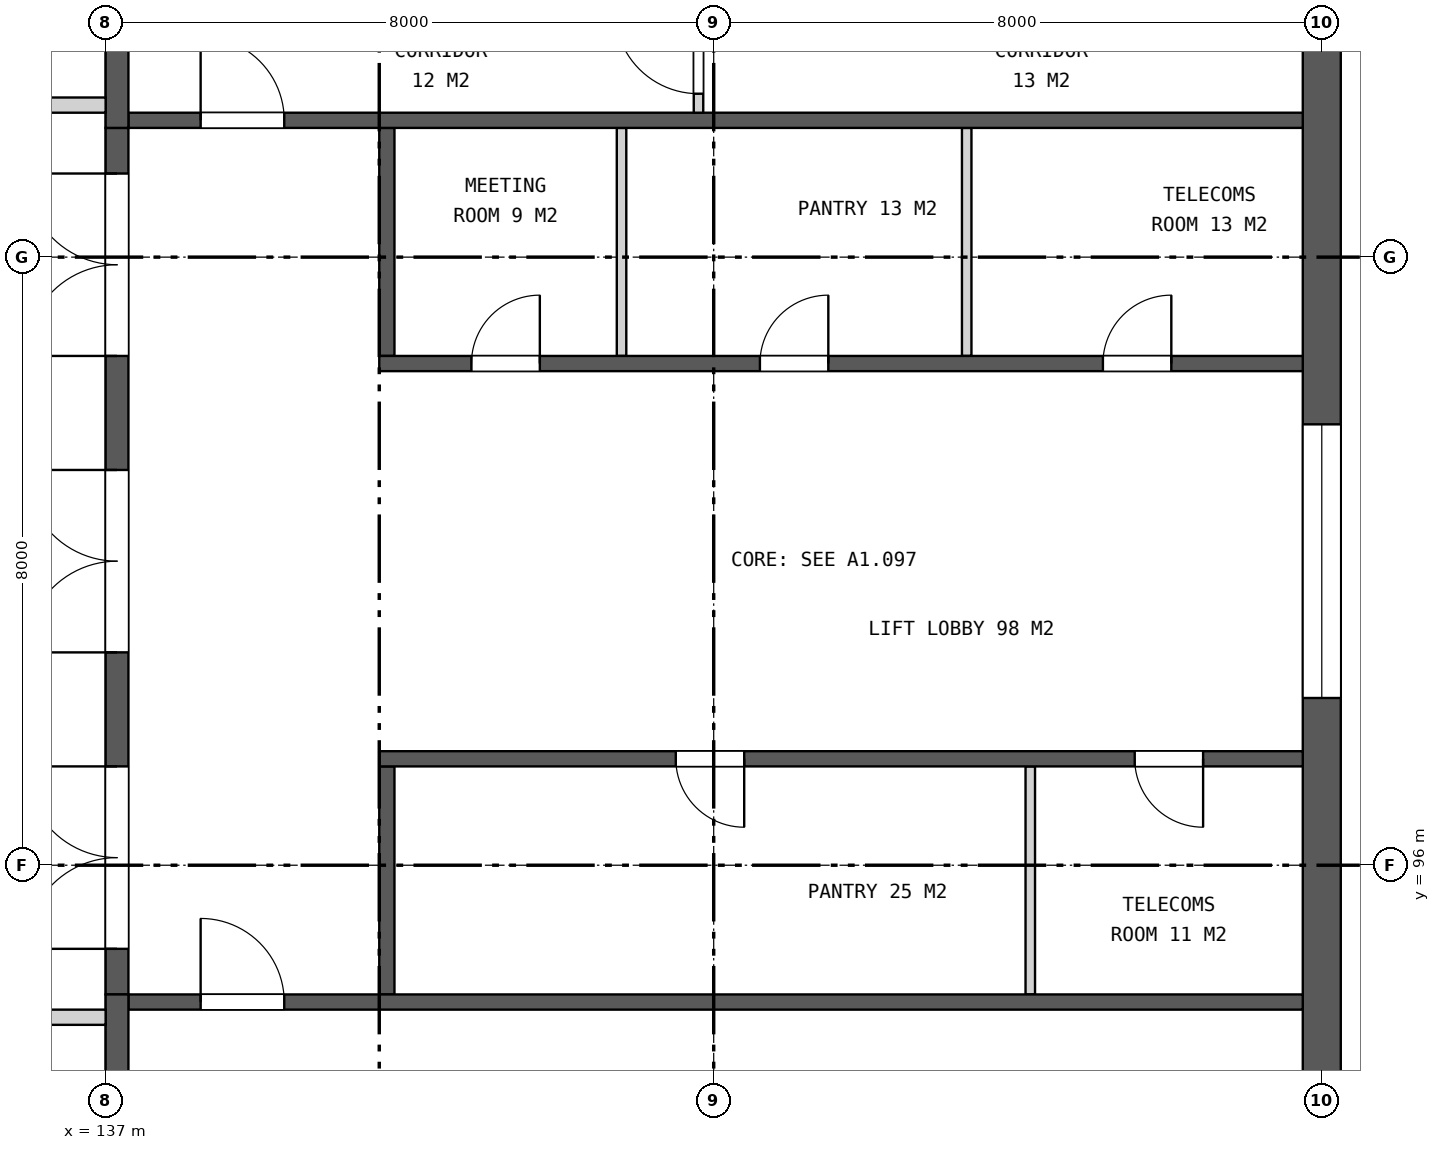
"""IFC4 building model, lengths in metres.
Left out: names, types, materials, properties, quantities, classifications, styles, units other than length and angle.
Written with IfcOpenShell. Run it as: python <this file> out.ifc"""

import sys

from ifc_helpers import new_model, si_unit, direction, frame, frame_2d, origin, place, context, subcontext, project, spatial, rectangle, extrude, element, fill, save


model = new_model("IFC4")
c1 = context("Model", 3, precision=1e-05, world=origin(), true_north=direction((0.0, 1.0)))
c2 = subcontext(c1, "Body", "Model", "MODEL_VIEW")
j1 = project(units=[si_unit("LENGTHUNIT", "METRE"), si_unit("PLANEANGLEUNIT", "RADIAN")], contexts=[c1])
p1 = place(None, origin())
s1 = spatial("IfcSite", under=j1, at=p1, CompositionType="ELEMENT")
p2 = place(p1, origin())
s2 = spatial("IfcBuilding", under=s1, at=p2, CompositionType="ELEMENT")
p3 = place(p2, frame((0.0, 0.0, 245.1)))
s3 = spatial("IfcBuildingStorey", under=s2, at=p3, CompositionType="ELEMENT", Elevation=245.1)
p4 = place(p3, frame((153.0, 88.25, 0.0), z_axis=(0.0, 0.0, 1.0), x_axis=(0.0, 1.0, 0.0)))
e1 = element("IfcWall", 1, at=p4, inside=s3, PredefinedType="SHEAR", context=c2, shape_type="SweptSolid", body=[
    extrude(rectangle(XDim=23.5, YDim=0.5, at=frame_2d((11.75, 0.0))), origin(), (0.0, 0.0, 1.0), 4.2),
])
p5 = place(p4, frame((9.95, 0.0, 0.15)))
e2 = element("IfcOpeningElement", 2, at=p5, cuts=e1, PredefinedType="OPENING", context=c2, shape_type="SweptSolid", body=[
    extrude(rectangle(XDim=3.6, YDim=3.0, at=frame_2d((1.8, 1.5))), frame((0.0, 0.26, 0.0), z_axis=(0.0, -1.0, 0.0), x_axis=(1.0, 0.0, 0.0)), (0.0, 0.0, 1.0), 0.52),
])
p6 = place(p3, frame((137.15, 94.3, 0.0), z_axis=(0.0, 0.0, 1.0), x_axis=(0.0, 1.0, 0.0)))
e3 = element("IfcWall", 3, at=p6, inside=s3, PredefinedType="SHEAR", context=c2, shape_type="SweptSolid", body=[
    extrude(rectangle(XDim=11.4, YDim=0.3, at=frame_2d((5.7, 0.0))), origin(), (0.0, 0.0, 1.0), 4.2),
])
p7 = place(p6, frame((0.6, 0.0, 0.0)))
e4 = element("IfcOpeningElement", 4, at=p7, cuts=e3, PredefinedType="OPENING", context=c2, shape_type="SweptSolid", body=[
    extrude(rectangle(XDim=2.4, YDim=2.4, at=frame_2d((1.2, 1.2))), frame((0.0, 0.16, 0.0), z_axis=(0.0, -1.0, 0.0), x_axis=(1.0, 0.0, 0.0)), (0.0, 0.0, 1.0), 0.32),
])
p8 = place(p6, frame((4.5, 0.0, 0.0)))
e5 = element("IfcOpeningElement", 5, at=p8, cuts=e3, PredefinedType="OPENING", context=c2, shape_type="SweptSolid", body=[
    extrude(rectangle(XDim=2.4, YDim=2.4, at=frame_2d((1.2, 1.2))), frame((0.0, 0.16, 0.0), z_axis=(0.0, -1.0, 0.0), x_axis=(1.0, 0.0, 0.0)), (0.0, 0.0, 1.0), 0.32),
])
p9 = place(p6, frame((8.4, 0.0, 0.0)))
e6 = element("IfcOpeningElement", 6, at=p9, cuts=e3, PredefinedType="OPENING", context=c2, shape_type="SweptSolid", body=[
    extrude(rectangle(XDim=2.4, YDim=2.4, at=frame_2d((1.2, 1.2))), frame((0.0, 0.16, 0.0), z_axis=(0.0, -1.0, 0.0), x_axis=(1.0, 0.0, 0.0)), (0.0, 0.0, 1.0), 0.32),
])
p10 = place(p3, frame((140.7, 102.7, 0.0), z_axis=(0.0, 0.0, 1.0), x_axis=(0.0, 1.0, 0.0)))
e7 = element("IfcWall", 7, at=p10, inside=s3, PredefinedType="SHEAR", context=c2, shape_type="SweptSolid", body=[
    extrude(rectangle(XDim=3.0, YDim=0.2, at=frame_2d((1.5, 0.0))), origin(), (0.0, 0.0, 1.0), 4.2),
])
for number, where, z_axis, x_axis in (
    (8, (143.788, 102.7, 0.0), (0.0, 0.0, 1.0), (0.0, 1.0, 0.0)),
    (9, (148.329, 102.7, 0.0), (0.0, 0.0, 1.0), (0.0, 1.0, 0.0)),
):
    element("IfcWall", number, at=place(p3, frame(where, z_axis=z_axis, x_axis=x_axis)), inside=s3, PredefinedType="PARTITIONING", context=c2, shape_type="SweptSolid", body=[
        extrude(rectangle(XDim=3.0, YDim=0.125, at=frame_2d((1.5, 0.0))), origin(), (0.0, 0.0, 1.0), 4.2),
    ])
p11 = place(p3, frame((140.6, 102.6, 0.0), z_axis=(0.0, 0.0, 1.0), x_axis=(1.0, 0.0, 0.0)))
e10 = element("IfcWall", 10, at=p11, inside=s3, PredefinedType="SHEAR", context=c2, shape_type="SweptSolid", body=[
    extrude(rectangle(XDim=12.15, YDim=0.2, at=frame_2d((6.075, 0.0))), origin(), (0.0, 0.0, 1.0), 4.2),
])
p12 = place(p11, frame((1.212, 0.0, 0.0)))
e11 = element("IfcOpeningElement", 11, at=p12, cuts=e10, PredefinedType="OPENING", context=c2, shape_type="SweptSolid", body=[
    extrude(rectangle(XDim=0.9, YDim=2.1, at=frame_2d((0.45, 1.05))), frame((0.0, 0.11, 0.0), z_axis=(0.0, -1.0, 0.0), x_axis=(1.0, 0.0, 0.0)), (0.0, 0.0, 1.0), 0.22),
])
p13 = place(p11, frame((5.008, 0.0, 0.0)))
e12 = element("IfcOpeningElement", 12, at=p13, cuts=e10, PredefinedType="OPENING", context=c2, shape_type="SweptSolid", body=[
    extrude(rectangle(XDim=0.9, YDim=2.1, at=frame_2d((0.45, 1.05))), frame((0.0, 0.11, 0.0), z_axis=(0.0, -1.0, 0.0), x_axis=(1.0, 0.0, 0.0)), (0.0, 0.0, 1.0), 0.22),
])
p14 = place(p11, frame((9.521, 0.0, 0.0)))
e13 = element("IfcOpeningElement", 13, at=p14, cuts=e10, PredefinedType="OPENING", context=c2, shape_type="SweptSolid", body=[
    extrude(rectangle(XDim=0.9, YDim=2.1, at=frame_2d((0.45, 1.05))), frame((0.0, 0.11, 0.0), z_axis=(0.0, -1.0, 0.0), x_axis=(1.0, 0.0, 0.0)), (0.0, 0.0, 1.0), 0.22),
])
p15 = place(p3, frame((140.7, 94.3, 0.0), z_axis=(0.0, 0.0, 1.0), x_axis=(0.0, 1.0, 0.0)))
e14 = element("IfcWall", 14, at=p15, inside=s3, PredefinedType="SHEAR", context=c2, shape_type="SweptSolid", body=[
    extrude(rectangle(XDim=3.0, YDim=0.2, at=frame_2d((1.5, 0.0))), origin(), (0.0, 0.0, 1.0), 4.2),
])
p16 = place(p3, frame((149.165, 94.3, 0.0), z_axis=(0.0, 0.0, 1.0), x_axis=(0.0, 1.0, 0.0)))
e15 = element("IfcWall", 15, at=p16, inside=s3, PredefinedType="PARTITIONING", context=c2, shape_type="SweptSolid", body=[
    extrude(rectangle(XDim=3.0, YDim=0.125, at=frame_2d((1.5, 0.0))), origin(), (0.0, 0.0, 1.0), 4.2),
])
p17 = place(p3, frame((140.6, 97.4, 0.0), z_axis=(0.0, 0.0, 1.0), x_axis=(1.0, 0.0, 0.0)))
e16 = element("IfcWall", 16, at=p17, inside=s3, PredefinedType="SHEAR", context=c2, shape_type="SweptSolid", body=[
    extrude(rectangle(XDim=12.15, YDim=0.2, at=frame_2d((6.075, 0.0))), origin(), (0.0, 0.0, 1.0), 4.2),
])
p18 = place(p17, frame((3.901, 0.0, 0.0)))
e17 = element("IfcOpeningElement", 17, at=p18, cuts=e16, PredefinedType="OPENING", context=c2, shape_type="SweptSolid", body=[
    extrude(rectangle(XDim=0.9, YDim=2.1, at=frame_2d((0.45, 1.05))), frame((0.0, 0.11, 0.0), z_axis=(0.0, -1.0, 0.0), x_axis=(1.0, 0.0, 0.0)), (0.0, 0.0, 1.0), 0.22),
])
p19 = place(p17, frame((9.939, 0.0, 0.0)))
e18 = element("IfcOpeningElement", 18, at=p19, cuts=e16, PredefinedType="OPENING", context=c2, shape_type="SweptSolid", body=[
    extrude(rectangle(XDim=0.9, YDim=2.1, at=frame_2d((0.45, 1.05))), frame((0.0, 0.11, 0.0), z_axis=(0.0, -1.0, 0.0), x_axis=(1.0, 0.0, 0.0)), (0.0, 0.0, 1.0), 0.22),
])
p20 = place(p3, frame((137.3, 105.8, 0.0), z_axis=(0.0, 0.0, 1.0), x_axis=(1.0, 0.0, 0.0)))
e19 = element("IfcWall", 19, at=p20, inside=s3, PredefinedType="SHEAR", context=c2, shape_type="SweptSolid", body=[
    extrude(rectangle(XDim=15.45, YDim=0.2, at=frame_2d((7.725, 0.0))), origin(), (0.0, 0.0, 1.0), 4.2),
])
p21 = place(p20, frame((0.95, 0.0, 0.0)))
e20 = element("IfcOpeningElement", 20, at=p21, cuts=e19, PredefinedType="OPENING", context=c2, shape_type="SweptSolid", body=[
    extrude(rectangle(XDim=1.1, YDim=2.1, at=frame_2d((0.55, 1.05))), frame((0.0, 0.11, 0.0), z_axis=(0.0, -1.0, 0.0), x_axis=(1.0, 0.0, 0.0)), (0.0, 0.0, 1.0), 0.22),
])
p22 = place(p3, frame((137.15, 105.7, 0.0), z_axis=(0.0, 0.0, 1.0), x_axis=(0.0, 1.0, 0.0)))
e21 = element("IfcWall", 21, at=p22, inside=s3, PredefinedType="SHEAR", context=c2, shape_type="SweptSolid", body=[
    extrude(rectangle(XDim=6.05, YDim=0.3, at=frame_2d((3.025, 0.0))), origin(), (0.0, 0.0, 1.0), 4.2),
])
p23 = place(p3, frame((144.8, 105.9, 0.0), z_axis=(0.0, 0.0, 1.0), x_axis=(0.0, 1.0, 0.0)))
e22 = element("IfcWall", 22, at=p23, inside=s3, PredefinedType="PARTITIONING", context=c2, shape_type="SweptSolid", body=[
    extrude(rectangle(XDim=1.6, YDim=0.125, at=frame_2d((0.8, 0.0))), origin(), (0.0, 0.0, 1.0), 4.2),
])
p24 = place(p23, frame((0.25, 0.0, 0.0)))
e23 = element("IfcOpeningElement", 23, at=p24, cuts=e22, PredefinedType="OPENING", context=c2, shape_type="SweptSolid", body=[
    extrude(rectangle(XDim=1.1, YDim=2.1, at=frame_2d((0.55, 1.05))), frame((0.0, 0.073, 0.0), z_axis=(0.0, -1.0, 0.0), x_axis=(1.0, 0.0, 0.0)), (0.0, 0.0, 1.0), 0.145),
])
p25 = place(p3, frame((137.3, 94.2, 0.0), z_axis=(0.0, 0.0, 1.0), x_axis=(1.0, 0.0, 0.0)))
e24 = element("IfcWall", 24, at=p25, inside=s3, PredefinedType="SHEAR", context=c2, shape_type="SweptSolid", body=[
    extrude(rectangle(XDim=15.45, YDim=0.2, at=frame_2d((7.725, 0.0))), origin(), (0.0, 0.0, 1.0), 4.2),
])
p26 = place(p25, frame((0.95, 0.0, 0.0)))
e25 = element("IfcOpeningElement", 25, at=p26, cuts=e24, PredefinedType="OPENING", context=c2, shape_type="SweptSolid", body=[
    extrude(rectangle(XDim=1.1, YDim=2.1, at=frame_2d((0.55, 1.05))), frame((0.0, 0.11, 0.0), z_axis=(0.0, -1.0, 0.0), x_axis=(1.0, 0.0, 0.0)), (0.0, 0.0, 1.0), 0.22),
])
p27 = place(p3, frame((137.15, 88.25, 0.0), z_axis=(0.0, 0.0, 1.0), x_axis=(0.0, 1.0, 0.0)))
e26 = element("IfcWall", 26, at=p27, inside=s3, PredefinedType="SHEAR", context=c2, shape_type="SweptSolid", body=[
    extrude(rectangle(XDim=6.05, YDim=0.3, at=frame_2d((3.025, 0.0))), origin(), (0.0, 0.0, 1.0), 4.2),
])
for number, where, z_axis, x_axis in (
    (27, (131.5, 94.0, 0.0), (0.0, 0.0, 1.0), (1.0, 0.0, 0.0)),
    (28, (131.5, 106.0, 0.0), (0.0, 0.0, 1.0), (1.0, 0.0, 0.0)),
):
    element("IfcWall", number, at=place(p3, frame(where, z_axis=z_axis, x_axis=x_axis)), inside=s3, PredefinedType="SOLIDWALL", context=c2, shape_type="SweptSolid", body=[
        extrude(rectangle(XDim=5.5, YDim=0.2, at=frame_2d((2.75, 0.0))), origin(), (0.0, 0.0, 1.0), 3.443),
    ])
p28 = place(p5, origin())
e29 = element("IfcWindow", 29, at=p28, inside=s3, PartitioningType="SINGLE_PANEL", PredefinedType="WINDOW", context=c2, shape_type="SweptSolid", body=[
    extrude(rectangle(XDim=3.6, YDim=3.0, at=frame_2d((1.8, 1.5))), frame((0.0, 0.03, 0.0), z_axis=(0.0, -1.0, 0.0), x_axis=(1.0, 0.0, 0.0)), (0.0, 0.0, 1.0), 0.06),
])
fill(e2, e29)
p29 = place(p7, origin())
e30 = element("IfcDoor", 30, at=p29, inside=s3, OperationType="DOUBLE_DOOR_SINGLE_SWING", PredefinedType="DOOR", context=c2, shape_type="SweptSolid", body=[
    extrude(rectangle(XDim=2.4, YDim=2.4, at=frame_2d((1.2, 1.2))), frame((0.0, 0.025, 0.0), z_axis=(0.0, -1.0, 0.0), x_axis=(1.0, 0.0, 0.0)), (0.0, 0.0, 1.0), 0.05),
])
fill(e4, e30)
p30 = place(p8, origin())
e31 = element("IfcDoor", 31, at=p30, inside=s3, OperationType="DOUBLE_DOOR_SINGLE_SWING", PredefinedType="DOOR", context=c2, shape_type="SweptSolid", body=[
    extrude(rectangle(XDim=2.4, YDim=2.4, at=frame_2d((1.2, 1.2))), frame((0.0, 0.025, 0.0), z_axis=(0.0, -1.0, 0.0), x_axis=(1.0, 0.0, 0.0)), (0.0, 0.0, 1.0), 0.05),
])
fill(e5, e31)
p31 = place(p9, origin())
e32 = element("IfcDoor", 32, at=p31, inside=s3, OperationType="DOUBLE_DOOR_SINGLE_SWING", PredefinedType="DOOR", context=c2, shape_type="SweptSolid", body=[
    extrude(rectangle(XDim=2.4, YDim=2.4, at=frame_2d((1.2, 1.2))), frame((0.0, 0.025, 0.0), z_axis=(0.0, -1.0, 0.0), x_axis=(1.0, 0.0, 0.0)), (0.0, 0.0, 1.0), 0.05),
])
fill(e6, e32)
p32 = place(p12, origin())
e33 = element("IfcDoor", 33, at=p32, inside=s3, OperationType="SINGLE_SWING_RIGHT", PredefinedType="DOOR", context=c2, shape_type="SweptSolid", body=[
    extrude(rectangle(XDim=0.9, YDim=2.1, at=frame_2d((0.45, 1.05))), frame((0.0, 0.025, 0.0), z_axis=(0.0, -1.0, 0.0), x_axis=(1.0, 0.0, 0.0)), (0.0, 0.0, 1.0), 0.05),
])
fill(e11, e33)
p33 = place(p13, origin())
e34 = element("IfcDoor", 34, at=p33, inside=s3, OperationType="SINGLE_SWING_RIGHT", PredefinedType="DOOR", context=c2, shape_type="SweptSolid", body=[
    extrude(rectangle(XDim=0.9, YDim=2.1, at=frame_2d((0.45, 1.05))), frame((0.0, 0.025, 0.0), z_axis=(0.0, -1.0, 0.0), x_axis=(1.0, 0.0, 0.0)), (0.0, 0.0, 1.0), 0.05),
])
fill(e12, e34)
p34 = place(p14, origin())
e35 = element("IfcDoor", 35, at=p34, inside=s3, OperationType="SINGLE_SWING_RIGHT", PredefinedType="DOOR", context=c2, shape_type="SweptSolid", body=[
    extrude(rectangle(XDim=0.9, YDim=2.1, at=frame_2d((0.45, 1.05))), frame((0.0, 0.025, 0.0), z_axis=(0.0, -1.0, 0.0), x_axis=(1.0, 0.0, 0.0)), (0.0, 0.0, 1.0), 0.05),
])
fill(e13, e35)
p35 = place(p18, frame((0.9, 0.0, 0.0), z_axis=(0.0, 0.0, 1.0), x_axis=(-1.0, 0.0, 0.0)))
e36 = element("IfcDoor", 36, at=p35, inside=s3, OperationType="SINGLE_SWING_LEFT", PredefinedType="DOOR", context=c2, shape_type="SweptSolid", body=[
    extrude(rectangle(XDim=0.9, YDim=2.1, at=frame_2d((0.45, 1.05))), frame((0.0, 0.025, 0.0), z_axis=(0.0, -1.0, 0.0), x_axis=(1.0, 0.0, 0.0)), (0.0, 0.0, 1.0), 0.05),
])
fill(e17, e36)
p36 = place(p19, frame((0.9, 0.0, 0.0), z_axis=(0.0, 0.0, 1.0), x_axis=(-1.0, 0.0, 0.0)))
e37 = element("IfcDoor", 37, at=p36, inside=s3, OperationType="SINGLE_SWING_LEFT", PredefinedType="DOOR", context=c2, shape_type="SweptSolid", body=[
    extrude(rectangle(XDim=0.9, YDim=2.1, at=frame_2d((0.45, 1.05))), frame((0.0, 0.025, 0.0), z_axis=(0.0, -1.0, 0.0), x_axis=(1.0, 0.0, 0.0)), (0.0, 0.0, 1.0), 0.05),
])
fill(e18, e37)
p37 = place(p21, origin())
e38 = element("IfcDoor", 38, at=p37, inside=s3, OperationType="SINGLE_SWING_LEFT", PredefinedType="DOOR", context=c2, shape_type="SweptSolid", body=[
    extrude(rectangle(XDim=1.1, YDim=2.1, at=frame_2d((0.55, 1.05))), frame((0.0, 0.025, 0.0), z_axis=(0.0, -1.0, 0.0), x_axis=(1.0, 0.0, 0.0)), (0.0, 0.0, 1.0), 0.05),
])
fill(e20, e38)
p38 = place(p24, origin())
e39 = element("IfcDoor", 39, at=p38, inside=s3, OperationType="SINGLE_SWING_RIGHT", PredefinedType="DOOR", context=c2, shape_type="SweptSolid", body=[
    extrude(rectangle(XDim=1.1, YDim=2.1, at=frame_2d((0.55, 1.05))), frame((0.0, 0.025, 0.0), z_axis=(0.0, -1.0, 0.0), x_axis=(1.0, 0.0, 0.0)), (0.0, 0.0, 1.0), 0.05),
])
fill(e23, e39)
p39 = place(p26, origin())
e40 = element("IfcDoor", 40, at=p39, inside=s3, OperationType="SINGLE_SWING_LEFT", PredefinedType="DOOR", context=c2, shape_type="SweptSolid", body=[
    extrude(rectangle(XDim=1.1, YDim=2.1, at=frame_2d((0.55, 1.05))), frame((0.0, 0.025, 0.0), z_axis=(0.0, -1.0, 0.0), x_axis=(1.0, 0.0, 0.0)), (0.0, 0.0, 1.0), 0.05),
])
fill(e25, e40)
save(model, sys.argv[1])
